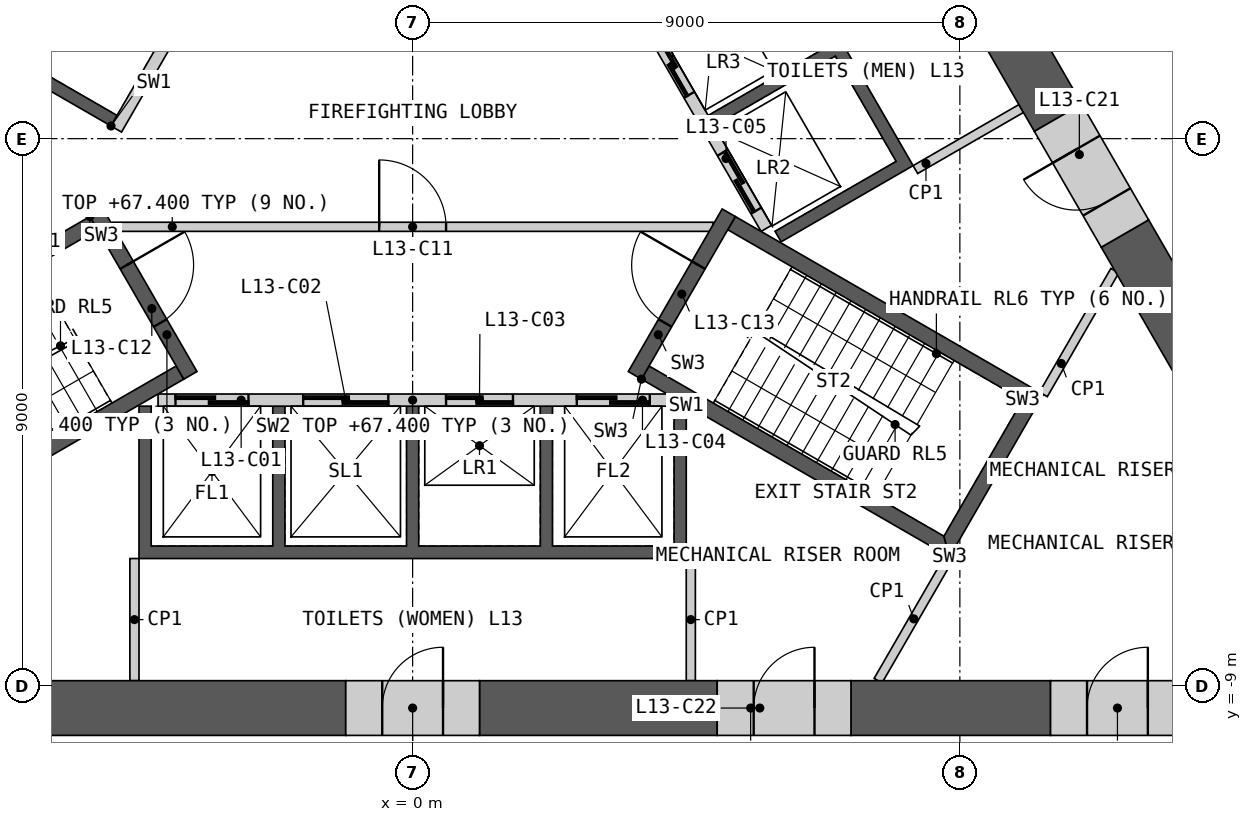
"""IFC4 building model, lengths in metres.
Left out: names, types, materials, properties, quantities, classifications, styles, units other than length and angle.
Written with IfcOpenShell. Run it as: python <this file> out.ifc"""

import sys

from ifc_helpers import new_model, si_unit, direction, frame, frame_2d, origin, place, context, subcontext, project, spatial, polyline, rectangle, outline, extrude, element, fill, save


model = new_model("IFC4")
c1 = context("Model", 3, precision=1e-05, world=origin(), true_north=direction((0.0, 1.0)))
c2 = subcontext(c1, "Body", "Model", "MODEL_VIEW")
j1 = project(units=[si_unit("LENGTHUNIT", "METRE"), si_unit("PLANEANGLEUNIT", "RADIAN")], contexts=[c1])
p1 = place(None, origin())
s1 = spatial("IfcSite", under=j1, at=p1, CompositionType="ELEMENT")
p2 = place(p1, origin())
s2 = spatial("IfcBuilding", under=s1, at=p2, CompositionType="ELEMENT")
p3 = place(p2, frame((0.0, 0.0, 63.6)))
s3 = spatial("IfcBuildingStorey", under=s2, at=p3, CompositionType="ELEMENT", Elevation=63.6)
p4 = place(p3, origin())
e1 = element("IfcWall", 1, at=p4, inside=s3, PredefinedType="SHEAR", context=c2, shape_type="SweptSolid", body=[
    extrude(outline(polyline([(4.5, -4.4), (4.5, -6.906), (-4.5, -6.906), (-4.5, -4.4), (-4.3, -4.4), (-4.3, -6.7), (-2.3, -6.7), (-2.3, -4.4), (-2.1, -4.4), (-2.1, -6.7), (-0.1, -6.7), (-0.1, -4.4), (0.1, -4.4), (0.1, -6.7), (2.1, -6.7), (2.1, -4.4), (2.3, -4.4), (2.3, -6.7), (4.3, -6.7), (4.3, -4.4), (4.5, -4.4)])), origin(), (0.0, 0.0, 1.0), 3.8),
])
p5 = place(p3, frame((-4.187, -4.3, 0.0), z_axis=(0.0, 0.0, 1.0), x_axis=(1.0, 0.0, 0.0)))
e2 = element("IfcWall", 2, at=p5, inside=s3, PredefinedType="SOLIDWALL", context=c2, shape_type="SweptSolid", body=[
    extrude(rectangle(XDim=8.373, YDim=0.2, at=frame_2d((4.187, 0.0))), origin(), (0.0, 0.0, 1.0), 3.8),
])
p6 = place(p5, frame((0.287, 0.0, 0.0)))
e3 = element("IfcOpeningElement", 3, at=p6, cuts=e2, PredefinedType="OPENING", context=c2, shape_type="SweptSolid", body=[
    extrude(rectangle(XDim=1.2, YDim=2.1, at=frame_2d((0.6, 1.05))), frame((0.0, 0.11, 0.0), z_axis=(0.0, -1.0, 0.0), x_axis=(1.0, 0.0, 0.0)), (0.0, 0.0, 1.0), 0.22),
])
p7 = place(p5, frame((2.387, 0.0, 0.0)))
e4 = element("IfcOpeningElement", 4, at=p7, cuts=e2, PredefinedType="OPENING", context=c2, shape_type="SweptSolid", body=[
    extrude(rectangle(XDim=1.4, YDim=2.1, at=frame_2d((0.7, 1.05))), frame((0.0, 0.11, 0.0), z_axis=(0.0, -1.0, 0.0), x_axis=(1.0, 0.0, 0.0)), (0.0, 0.0, 1.0), 0.22),
])
p8 = place(p5, frame((4.737, 0.0, 0.0)))
e5 = element("IfcOpeningElement", 5, at=p8, cuts=e2, PredefinedType="OPENING", context=c2, shape_type="SweptSolid", body=[
    extrude(rectangle(XDim=1.1, YDim=2.1, at=frame_2d((0.55, 1.05))), frame((0.0, 0.11, 0.0), z_axis=(0.0, -1.0, 0.0), x_axis=(1.0, 0.0, 0.0)), (0.0, 0.0, 1.0), 0.22),
])
p9 = place(p5, frame((6.887, 0.0, 0.0)))
e6 = element("IfcOpeningElement", 6, at=p9, cuts=e2, PredefinedType="OPENING", context=c2, shape_type="SweptSolid", body=[
    extrude(rectangle(XDim=1.2, YDim=2.1, at=frame_2d((0.6, 1.05))), frame((0.0, 0.11, 0.0), z_axis=(0.0, -1.0, 0.0), x_axis=(1.0, 0.0, 0.0)), (0.0, 0.0, 1.0), 0.22),
])
p10 = place(p3, origin())
e7 = element("IfcWall", 7, at=p10, inside=s3, PredefinedType="SHEAR", context=c2, shape_type="SweptSolid", body=[
    extrude(outline(polyline([(2.66, 4.192), (4.831, 5.445), (8.231, -0.444), (6.061, -1.697), (5.96, -1.524), (7.952, -0.374), (6.952, 1.358), (4.96, 0.208), (4.861, 0.381), (6.852, 1.531), (5.852, 3.263), (3.861, 2.113), (3.76, 2.287), (5.752, 3.437), (4.752, 5.169), (2.76, 4.019), (2.66, 4.192)])), origin(), (0.0, 0.0, 1.0), 3.8),
])
p11 = place(p3, frame((5.817, -1.476, 0.0), z_axis=(0.0, 0.0, 1.0), x_axis=(-0.500002616675, 0.866023893041, 0.0)))
e8 = element("IfcWall", 8, at=p11, inside=s3, PredefinedType="SOLIDWALL", context=c2, shape_type="SweptSolid", body=[
    extrude(rectangle(XDim=8.373, YDim=0.2, at=frame_2d((4.187, 0.0))), origin(), (0.0, 0.0, 1.0), 3.8),
])
p12 = place(p11, frame((0.337, 0.0, 0.0)))
e9 = element("IfcOpeningElement", 9, at=p12, cuts=e8, PredefinedType="OPENING", context=c2, shape_type="SweptSolid", body=[
    extrude(rectangle(XDim=1.1, YDim=2.1, at=frame_2d((0.55, 1.05))), frame((0.0, 0.11, 0.0), z_axis=(0.0, -1.0, 0.0), x_axis=(1.0, 0.0, 0.0)), (0.0, 0.0, 1.0), 0.22),
])
p13 = place(p11, frame((2.537, 0.0, 0.0)))
e10 = element("IfcOpeningElement", 10, at=p13, cuts=e8, PredefinedType="OPENING", context=c2, shape_type="SweptSolid", body=[
    extrude(rectangle(XDim=1.1, YDim=2.1, at=frame_2d((0.55, 1.05))), frame((0.0, 0.11, 0.0), z_axis=(0.0, -1.0, 0.0), x_axis=(1.0, 0.0, 0.0)), (0.0, 0.0, 1.0), 0.22),
])
p14 = place(p11, frame((4.737, 0.0, 0.0)))
e11 = element("IfcOpeningElement", 11, at=p14, cuts=e8, PredefinedType="OPENING", context=c2, shape_type="SweptSolid", body=[
    extrude(rectangle(XDim=1.1, YDim=2.1, at=frame_2d((0.55, 1.05))), frame((0.0, 0.11, 0.0), z_axis=(0.0, -1.0, 0.0), x_axis=(1.0, 0.0, 0.0)), (0.0, 0.0, 1.0), 0.22),
])
p15 = place(p11, frame((7.037, 0.0, 0.0)))
e12 = element("IfcOpeningElement", 12, at=p15, cuts=e8, PredefinedType="OPENING", context=c2, shape_type="SweptSolid", body=[
    extrude(rectangle(XDim=0.9, YDim=2.1, at=frame_2d((0.45, 1.05))), frame((0.0, 0.11, 0.0), z_axis=(0.0, -1.0, 0.0), x_axis=(1.0, 0.0, 0.0)), (0.0, 0.0, 1.0), 0.22),
])
p16 = place(p3, origin())
e13 = element("IfcWall", 13, at=p16, inside=s3, PredefinedType="SHEAR", context=c2, shape_type="SweptSolid", body=[
    extrude(outline(polyline([(-4.96, 0.208), (-7.131, 1.461), (-5.931, 3.54), (-3.76, 2.287), (-3.861, 2.113), (-5.852, 3.263), (-6.852, 1.531), (-4.861, 0.381), (-4.96, 0.208)])), origin(), (0.0, 0.0, 1.0), 3.8),
])
p17 = place(p3, frame((-1.631, 5.776, 0.0), z_axis=(0.0, 0.0, 1.0), x_axis=(-0.499992876559, -0.866029516466, 0.0)))
e14 = element("IfcWall", 14, at=p17, inside=s3, PredefinedType="SOLIDWALL", context=c2, shape_type="SweptSolid", body=[
    extrude(rectangle(XDim=6.486, YDim=0.2, at=frame_2d((3.243, 0.0))), origin(), (0.0, 0.0, 1.0), 3.8),
])
p18 = place(p17, frame((0.437, 0.0, 0.0)))
e15 = element("IfcOpeningElement", 15, at=p18, cuts=e14, PredefinedType="OPENING", context=c2, shape_type="SweptSolid", body=[
    extrude(rectangle(XDim=0.9, YDim=2.1, at=frame_2d((0.45, 1.05))), frame((0.0, 0.11, 0.0), z_axis=(0.0, -1.0, 0.0), x_axis=(1.0, 0.0, 0.0)), (0.0, 0.0, 1.0), 0.22),
])
p19 = place(p17, frame((2.637, 0.0, 0.0)))
e16 = element("IfcOpeningElement", 16, at=p19, cuts=e14, PredefinedType="OPENING", context=c2, shape_type="SweptSolid", body=[
    extrude(rectangle(XDim=0.9, YDim=2.1, at=frame_2d((0.45, 1.05))), frame((0.0, 0.11, 0.0), z_axis=(0.0, -1.0, 0.0), x_axis=(1.0, 0.0, 0.0)), (0.0, 0.0, 1.0), 0.22),
])
p20 = place(p3, frame((-4.941, -1.45, 0.0), z_axis=(0.0, 0.0, 1.0), x_axis=(1.0, 0.0, 0.0)))
e17 = element("IfcWall", 17, at=p20, inside=s3, PredefinedType="PARTITIONING", context=c2, shape_type="SweptSolid", body=[
    extrude(rectangle(XDim=9.882, YDim=0.15, at=frame_2d((4.941, 0.0))), origin(), (0.0, 0.0, 1.0), 3.8),
])
p21 = place(p20, frame((4.391, 0.0, 0.0)))
e18 = element("IfcOpeningElement", 18, at=p21, cuts=e17, PredefinedType="OPENING", context=c2, shape_type="SweptSolid", body=[
    extrude(rectangle(XDim=1.1, YDim=2.1, at=frame_2d((0.55, 1.05))), frame((0.0, 0.085, 0.0), z_axis=(0.0, -1.0, 0.0), x_axis=(1.0, 0.0, 0.0)), (0.0, 0.0, 1.0), 0.17),
])
p22 = place(p3, origin())
e19 = element("IfcWall", 19, at=p22, inside=s3, PredefinedType="SHEAR", context=c2, shape_type="SweptSolid", body=[
    extrude(outline(polyline([(-5.307, -1.281), (-10.374, -4.206), (-10.032, -4.298), (-5.182, -1.498), (-5.307, -1.281)])), origin(), (0.0, 0.0, 1.0), 3.8),
])
p23 = place(p3, origin())
e20 = element("IfcWall", 20, at=p23, inside=s3, PredefinedType="SHEAR", context=c2, shape_type="SweptSolid", body=[
    extrude(outline(polyline([(-8.738, -6.539), (-8.83, -6.881), (-3.763, -3.956), (-3.888, -3.739), (-8.738, -6.539)])), origin(), (0.0, 0.0, 1.0), 3.8),
])
p24 = place(p3, frame((-5.199, -1.219, 0.0), z_axis=(0.0, 0.0, 1.0), x_axis=(0.499982516597, -0.866035497597, 0.0)))
e21 = element("IfcWall", 21, at=p24, inside=s3, PredefinedType="SHEAR", context=c2, shape_type="SweptSolid", body=[
    extrude(rectangle(XDim=3.088, YDim=0.25, at=frame_2d((1.544, 0.0))), origin(), (0.0, 0.0, 1.0), 3.8),
])
p25 = place(p24, frame((0.994, 0.0, 0.0)))
e22 = element("IfcOpeningElement", 22, at=p25, cuts=e21, PredefinedType="OPENING", context=c2, shape_type="SweptSolid", body=[
    extrude(rectangle(XDim=1.1, YDim=2.1, at=frame_2d((0.55, 1.05))), frame((0.0, 0.135, 0.0), z_axis=(0.0, -1.0, 0.0), x_axis=(1.0, 0.0, 0.0)), (0.0, 0.0, 1.0), 0.27),
])
p26 = place(p3, origin())
e23 = element("IfcWall", 23, at=p26, inside=s3, PredefinedType="SHEAR", context=c2, shape_type="SweptSolid", body=[
    extrude(outline(polyline([(3.763, -3.956), (8.83, -6.881), (8.738, -6.539), (3.888, -3.739), (3.763, -3.956)])), origin(), (0.0, 0.0, 1.0), 3.8),
])
p27 = place(p3, origin())
e24 = element("IfcWall", 24, at=p27, inside=s3, PredefinedType="SHEAR", context=c2, shape_type="SweptSolid", body=[
    extrude(outline(polyline([(8.83, -6.881), (10.374, -4.206), (10.032, -4.298), (8.738, -6.539), (8.83, -6.881)])), origin(), (0.0, 0.0, 1.0), 3.8),
])
p28 = place(p3, origin())
e25 = element("IfcWall", 25, at=p28, inside=s3, PredefinedType="SHEAR", context=c2, shape_type="SweptSolid", body=[
    extrude(outline(polyline([(10.032, -4.298), (10.374, -4.206), (5.307, -1.281), (5.182, -1.498), (10.032, -4.298)])), origin(), (0.0, 0.0, 1.0), 3.8),
])
p29 = place(p3, frame((3.655, -3.893, 0.0), z_axis=(0.0, 0.0, 1.0), x_axis=(0.499982516597, 0.866035497597, 0.0)))
e26 = element("IfcWall", 26, at=p29, inside=s3, PredefinedType="SHEAR", context=c2, shape_type="SweptSolid", body=[
    extrude(rectangle(XDim=3.088, YDim=0.25, at=frame_2d((1.544, 0.0))), origin(), (0.0, 0.0, 1.0), 3.8),
])
p30 = place(p29, frame((0.994, 0.0, 0.0)))
e27 = element("IfcOpeningElement", 27, at=p30, cuts=e26, PredefinedType="OPENING", context=c2, shape_type="SweptSolid", body=[
    extrude(rectangle(XDim=1.1, YDim=2.1, at=frame_2d((0.55, 1.05))), frame((0.0, 0.135, 0.0), z_axis=(0.0, -1.0, 0.0), x_axis=(1.0, 0.0, 0.0)), (0.0, 0.0, 1.0), 0.27),
])
for number, where, z_axis, x_axis in (
    (28, (4.575, -6.906, 0.0), (0.0, 0.0, 1.0), (0.0, -1.0, 0.0)),
    (29, (-4.575, -6.906, 0.0), (0.0, 0.0, 1.0), (0.0, -1.0, 0.0)),
):
    element("IfcWall", number, at=place(p3, frame(where, z_axis=z_axis, x_axis=x_axis)), inside=s3, PredefinedType="PARTITIONING", context=c2, shape_type="SweptSolid", body=[
        extrude(rectangle(XDim=2.009, YDim=0.15, at=frame_2d((1.004, 0.0))), origin(), (0.0, 0.0, 1.0), 3.8),
    ])
p31 = place(p3, frame((8.268, -0.509, 0.0), z_axis=(0.0, 0.0, 1.0), x_axis=(0.866035824272, 0.499981950752, 0.0)))
e30 = element("IfcWall", 30, at=p31, inside=s3, PredefinedType="PARTITIONING", context=c2, shape_type="SweptSolid", body=[
    extrude(rectangle(XDim=2.009, YDim=0.15, at=frame_2d((1.004, 0.0))), origin(), (0.0, 0.0, 1.0), 3.8),
])
p32 = place(p3, frame((8.83, -6.881, 0.0), z_axis=(0.0, 0.0, 1.0), x_axis=(-0.500073279432, -0.865983091751, 0.0)))
e31 = element("IfcWall", 31, at=p32, inside=s3, PredefinedType="PARTITIONING", context=c2, shape_type="SweptSolid", body=[
    extrude(rectangle(XDim=2.349, YDim=0.15, at=frame_2d((1.175, 0.0))), origin(), (0.0, 0.0, 1.0), 3.8),
])
p33 = place(p3, frame((10.374, -4.206, 0.0), z_axis=(0.0, 0.0, 1.0), x_axis=(0.499995339376, 0.86602809458, 0.0)))
e32 = element("IfcWall", 32, at=p33, inside=s3, PredefinedType="PARTITIONING", context=c2, shape_type="SweptSolid", body=[
    extrude(rectangle(XDim=2.349, YDim=0.15, at=frame_2d((1.175, 0.0))), origin(), (0.0, 0.0, 1.0), 3.8),
])
p34 = place(p3, frame((-15.441, -9.365, 0.0), z_axis=(0.0, 0.0, 1.0), x_axis=(1.0, 0.0, 0.0)))
e33 = element("IfcWall", 33, at=p34, inside=s3, PredefinedType="SHEAR", context=c2, shape_type="SweptSolid", body=[
    extrude(rectangle(XDim=14.341, YDim=0.9, at=frame_2d((7.17, 0.0))), origin(), (0.0, 0.0, 1.0), 3.8),
])
p35 = place(p3, frame((1.1, -9.365, 0.0), z_axis=(0.0, 0.0, 1.0), x_axis=(1.0, 0.0, 0.0)))
e34 = element("IfcWall", 34, at=p35, inside=s3, PredefinedType="SHEAR", context=c2, shape_type="SweptSolid", body=[
    extrude(rectangle(XDim=3.909, YDim=0.9, at=frame_2d((1.955, 0.0))), origin(), (0.0, 0.0, 1.0), 3.8),
])
p36 = place(p3, frame((7.209, -9.365, 0.0), z_axis=(0.0, 0.0, 1.0), x_axis=(1.0, 0.0, 0.0)))
e35 = element("IfcWall", 35, at=p36, inside=s3, PredefinedType="SHEAR", context=c2, shape_type="SweptSolid", body=[
    extrude(rectangle(XDim=3.282, YDim=0.9, at=frame_2d((1.641, 0.0))), origin(), (0.0, 0.0, 1.0), 3.8),
])
p37 = place(p3, frame((15.831, -8.69, 0.0), z_axis=(0.0, 0.0, 1.0), x_axis=(-0.499995435471, 0.8660280391, 0.0)))
e36 = element("IfcWall", 36, at=p37, inside=s3, PredefinedType="SHEAR", context=c2, shape_type="SweptSolid", body=[
    extrude(rectangle(XDim=8.232, YDim=0.9, at=frame_2d((4.116, 0.0))), origin(), (0.0, 0.0, 1.0), 3.8),
])
p38 = place(p3, frame((10.615, 0.344, 0.0), z_axis=(0.0, 0.0, 1.0), x_axis=(-0.500044870432, 0.865999496279, 0.0)))
e37 = element("IfcWall", 37, at=p38, inside=s3, PredefinedType="SHEAR", context=c2, shape_type="SweptSolid", body=[
    extrude(rectangle(XDim=2.709, YDim=0.9, at=frame_2d((1.354, 0.0))), origin(), (0.0, 0.0, 1.0), 3.8),
])
p39 = place(p3, frame((-1.1, -9.365, 0.0), z_axis=(0.0, 0.0, 1.0), x_axis=(1.0, 0.0, 0.0)))
e38 = element("IfcWall", 38, at=p39, inside=s3, PredefinedType="SHEAR", context=c2, shape_type="SweptSolid", body=[
    extrude(rectangle(XDim=2.2, YDim=0.9, at=frame_2d((1.1, 0.0))), origin(), (0.0, 0.0, 1.0), 3.8),
])
p40 = place(p39, frame((0.6, 0.0, 0.0)))
e39 = element("IfcOpeningElement", 39, at=p40, cuts=e38, PredefinedType="OPENING", context=c2, shape_type="SweptSolid", body=[
    extrude(rectangle(XDim=1.0, YDim=2.1, at=frame_2d((0.5, 1.05))), frame((0.0, 0.46, 0.0), z_axis=(0.0, -1.0, 0.0), x_axis=(1.0, 0.0, 0.0)), (0.0, 0.0, 1.0), 0.92),
])
p41 = place(p3, frame((10.491, -9.365, 0.0), z_axis=(0.0, 0.0, 1.0), x_axis=(1.0, 0.0, 0.0)))
e40 = element("IfcWall", 40, at=p41, inside=s3, PredefinedType="SHEAR", context=c2, shape_type="SweptSolid", body=[
    extrude(rectangle(XDim=2.2, YDim=0.9, at=frame_2d((1.1, 0.0))), origin(), (0.0, 0.0, 1.0), 3.8),
])
p42 = place(p41, frame((0.6, 0.0, 0.0)))
e41 = element("IfcOpeningElement", 41, at=p42, cuts=e40, PredefinedType="OPENING", context=c2, shape_type="SweptSolid", body=[
    extrude(rectangle(XDim=1.0, YDim=2.1, at=frame_2d((0.5, 1.05))), frame((0.0, 0.46, 0.0), z_axis=(0.0, -1.0, 0.0), x_axis=(1.0, 0.0, 0.0)), (0.0, 0.0, 1.0), 0.92),
])
p43 = place(p3, frame((11.715, -1.561, 0.0), z_axis=(0.0, 0.0, 1.0), x_axis=(-0.499946605688, 0.86605622881, 0.0)))
e42 = element("IfcWall", 42, at=p43, inside=s3, PredefinedType="SHEAR", context=c2, shape_type="SweptSolid", body=[
    extrude(rectangle(XDim=2.2, YDim=0.9, at=frame_2d((1.1, 0.0))), origin(), (0.0, 0.0, 1.0), 3.8),
])
p44 = place(p43, frame((0.6, 0.0, 0.0)))
e43 = element("IfcOpeningElement", 43, at=p44, cuts=e42, PredefinedType="OPENING", context=c2, shape_type="SweptSolid", body=[
    extrude(rectangle(XDim=1.0, YDim=2.1, at=frame_2d((0.5, 1.05))), frame((0.0, 0.46, 0.0), z_axis=(0.0, -1.0, 0.0), x_axis=(1.0, 0.0, 0.0)), (0.0, 0.0, 1.0), 0.92),
])
p45 = place(p3, frame((5.009, -9.365, 0.0), z_axis=(0.0, 0.0, 1.0), x_axis=(1.0, 0.0, 0.0)))
e44 = element("IfcWall", 44, at=p45, inside=s3, PredefinedType="SHEAR", context=c2, shape_type="SweptSolid", body=[
    extrude(rectangle(XDim=2.2, YDim=0.9, at=frame_2d((1.1, 0.0))), origin(), (0.0, 0.0, 1.0), 3.8),
])
p46 = place(p45, frame((0.6, 0.0, 0.0)))
e45 = element("IfcOpeningElement", 45, at=p46, cuts=e44, PredefinedType="OPENING", context=c2, shape_type="SweptSolid", body=[
    extrude(rectangle(XDim=1.0, YDim=2.1, at=frame_2d((0.5, 1.05))), frame((0.0, 0.46, 0.0), z_axis=(0.0, -1.0, 0.0), x_axis=(1.0, 0.0, 0.0)), (0.0, 0.0, 1.0), 0.92),
])
p47 = place(p3, frame((10.719, 5.865, 0.0), z_axis=(0.0, 0.0, 1.0), x_axis=(0.49999175339, -0.866030164915, 0.0)))
e46 = element("IfcWall", 46, at=p47, inside=s3, PredefinedType="PARTITIONING", context=c2, shape_type="SweptSolid", body=[
    extrude(rectangle(XDim=10.019, YDim=0.2, at=frame_2d((5.009, 0.0))), origin(), (0.0, 0.0, 1.0), 3.8),
])
p48 = place(p47, frame((4.585, 0.0, 0.0)))
e47 = element("IfcOpeningElement", 47, at=p48, cuts=e46, PredefinedType="OPENING", context=c2, shape_type="SweptSolid", body=[
    extrude(rectangle(XDim=0.95, YDim=2.1, at=frame_2d((0.475, 1.05))), frame((0.0, 0.11, 0.0), z_axis=(0.0, -1.0, 0.0), x_axis=(1.0, 0.0, 0.0)), (0.0, 0.0, 1.0), 0.22),
])
p49 = place(p6, origin())
e48 = element("IfcDoor", 48, at=p49, inside=s3, OperationType="SLIDING_TO_LEFT", PredefinedType="DOOR", context=c2, shape_type="SweptSolid", body=[
    extrude(rectangle(XDim=1.2, YDim=2.1, at=frame_2d((0.6, 1.05))), frame((0.0, 0.025, 0.0), z_axis=(0.0, -1.0, 0.0), x_axis=(1.0, 0.0, 0.0)), (0.0, 0.0, 1.0), 0.05),
])
fill(e3, e48)
p50 = place(p7, origin())
e49 = element("IfcDoor", 49, at=p50, inside=s3, OperationType="SLIDING_TO_LEFT", PredefinedType="DOOR", context=c2, shape_type="SweptSolid", body=[
    extrude(rectangle(XDim=1.4, YDim=2.1, at=frame_2d((0.7, 1.05))), frame((0.0, 0.025, 0.0), z_axis=(0.0, -1.0, 0.0), x_axis=(1.0, 0.0, 0.0)), (0.0, 0.0, 1.0), 0.05),
])
fill(e4, e49)
p51 = place(p8, origin())
e50 = element("IfcDoor", 50, at=p51, inside=s3, OperationType="SLIDING_TO_LEFT", PredefinedType="DOOR", context=c2, shape_type="SweptSolid", body=[
    extrude(rectangle(XDim=1.1, YDim=2.1, at=frame_2d((0.55, 1.05))), frame((0.0, 0.025, 0.0), z_axis=(0.0, -1.0, 0.0), x_axis=(1.0, 0.0, 0.0)), (0.0, 0.0, 1.0), 0.05),
])
fill(e5, e50)
p52 = place(p9, origin())
e51 = element("IfcDoor", 51, at=p52, inside=s3, OperationType="SLIDING_TO_LEFT", PredefinedType="DOOR", context=c2, shape_type="SweptSolid", body=[
    extrude(rectangle(XDim=1.2, YDim=2.1, at=frame_2d((0.6, 1.05))), frame((0.0, 0.025, 0.0), z_axis=(0.0, -1.0, 0.0), x_axis=(1.0, 0.0, 0.0)), (0.0, 0.0, 1.0), 0.05),
])
fill(e6, e51)
p53 = place(p12, origin())
e52 = element("IfcDoor", 52, at=p53, inside=s3, OperationType="SLIDING_TO_LEFT", PredefinedType="DOOR", context=c2, shape_type="SweptSolid", body=[
    extrude(rectangle(XDim=1.1, YDim=2.1, at=frame_2d((0.55, 1.05))), frame((0.0, 0.025, 0.0), z_axis=(0.0, -1.0, 0.0), x_axis=(1.0, 0.0, 0.0)), (0.0, 0.0, 1.0), 0.05),
])
fill(e9, e52)
p54 = place(p13, origin())
e53 = element("IfcDoor", 53, at=p54, inside=s3, OperationType="SLIDING_TO_LEFT", PredefinedType="DOOR", context=c2, shape_type="SweptSolid", body=[
    extrude(rectangle(XDim=1.1, YDim=2.1, at=frame_2d((0.55, 1.05))), frame((0.0, 0.025, 0.0), z_axis=(0.0, -1.0, 0.0), x_axis=(1.0, 0.0, 0.0)), (0.0, 0.0, 1.0), 0.05),
])
fill(e10, e53)
p55 = place(p21, origin())
e54 = element("IfcDoor", 54, at=p55, inside=s3, OperationType="SINGLE_SWING_LEFT", PredefinedType="DOOR", context=c2, shape_type="SweptSolid", body=[
    extrude(rectangle(XDim=1.1, YDim=2.1, at=frame_2d((0.55, 1.05))), frame((0.0, 0.025, 0.0), z_axis=(0.0, -1.0, 0.0), x_axis=(1.0, 0.0, 0.0)), (0.0, 0.0, 1.0), 0.05),
])
fill(e18, e54)
p56 = place(p25, origin())
e55 = element("IfcDoor", 55, at=p56, inside=s3, OperationType="SINGLE_SWING_LEFT", PredefinedType="DOOR", context=c2, shape_type="SweptSolid", body=[
    extrude(rectangle(XDim=1.1, YDim=2.1, at=frame_2d((0.55, 1.05))), frame((0.0, 0.025, 0.0), z_axis=(0.0, -1.0, 0.0), x_axis=(1.0, 0.0, 0.0)), (0.0, 0.0, 1.0), 0.05),
])
fill(e22, e55)
p57 = place(p30, origin())
e56 = element("IfcDoor", 56, at=p57, inside=s3, OperationType="SINGLE_SWING_RIGHT", PredefinedType="DOOR", context=c2, shape_type="SweptSolid", body=[
    extrude(rectangle(XDim=1.1, YDim=2.1, at=frame_2d((0.55, 1.05))), frame((0.0, 0.025, 0.0), z_axis=(0.0, -1.0, 0.0), x_axis=(1.0, 0.0, 0.0)), (0.0, 0.0, 1.0), 0.05),
])
fill(e27, e56)
p58 = place(p40, origin())
e57 = element("IfcDoor", 57, at=p58, inside=s3, OperationType="SINGLE_SWING_RIGHT", PredefinedType="DOOR", context=c2, shape_type="SweptSolid", body=[
    extrude(rectangle(XDim=1.0, YDim=2.1, at=frame_2d((0.5, 1.05))), frame((0.0, 0.205, 0.0), z_axis=(0.0, -1.0, 0.0), x_axis=(1.0, 0.0, 0.0)), (0.0, 0.0, 1.0), 0.05),
])
fill(e39, e57)
p59 = place(p42, origin())
e58 = element("IfcDoor", 58, at=p59, inside=s3, OperationType="SINGLE_SWING_RIGHT", PredefinedType="DOOR", context=c2, shape_type="SweptSolid", body=[
    extrude(rectangle(XDim=1.0, YDim=2.1, at=frame_2d((0.5, 1.05))), frame((0.0, 0.205, 0.0), z_axis=(0.0, -1.0, 0.0), x_axis=(1.0, 0.0, 0.0)), (0.0, 0.0, 1.0), 0.05),
])
fill(e41, e58)
p60 = place(p44, origin())
e59 = element("IfcDoor", 59, at=p60, inside=s3, OperationType="SINGLE_SWING_RIGHT", PredefinedType="DOOR", context=c2, shape_type="SweptSolid", body=[
    extrude(rectangle(XDim=1.0, YDim=2.1, at=frame_2d((0.5, 1.05))), frame((0.0, 0.205, 0.0), z_axis=(0.0, -1.0, 0.0), x_axis=(1.0, 0.0, 0.0)), (0.0, 0.0, 1.0), 0.05),
])
fill(e43, e59)
p61 = place(p46, origin())
e60 = element("IfcDoor", 60, at=p61, inside=s3, OperationType="SINGLE_SWING_RIGHT", PredefinedType="DOOR", context=c2, shape_type="SweptSolid", body=[
    extrude(rectangle(XDim=1.0, YDim=2.1, at=frame_2d((0.5, 1.05))), frame((0.0, 0.205, 0.0), z_axis=(0.0, -1.0, 0.0), x_axis=(1.0, 0.0, 0.0)), (0.0, 0.0, 1.0), 0.05),
])
fill(e45, e60)
save(model, sys.argv[1])
